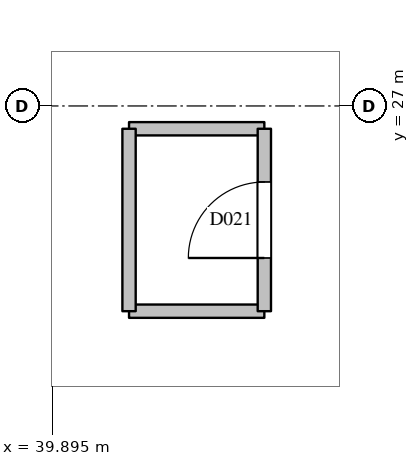
"""IFC4 building model, lengths in metres.
Left out: names, types, materials, properties, quantities, classifications, styles, units other than length and angle.
Written with IfcOpenShell. Run it as: python <this file> out.ifc"""

import sys

from ifc_helpers import new_model, si_unit, direction, frame, frame_2d, origin, place, context, subcontext, project, spatial, rectangle, extrude, element, fill, save


model = new_model("IFC4")
c1 = context("Model", 3, precision=1e-05, world=origin(), true_north=direction((0.0, 1.0)))
c2 = subcontext(c1, "Body", "Model", "MODEL_VIEW")
j1 = project(units=[si_unit("LENGTHUNIT", "METRE"), si_unit("PLANEANGLEUNIT", "RADIAN")], contexts=[c1])
p1 = place(None, origin())
s1 = spatial("IfcSite", under=j1, at=p1, CompositionType="ELEMENT")
p2 = place(p1, origin())
s2 = spatial("IfcBuilding", under=s1, at=p2, CompositionType="ELEMENT")
p3 = place(p2, frame((0.0, 0.0, 42.4)))
s3 = spatial("IfcBuildingStorey", under=s2, at=p3, CompositionType="ELEMENT", Elevation=42.4)
p4 = place(p3, frame((40.9, 24.3, 0.0), z_axis=(0.0, 0.0, 1.0), x_axis=(1.0, 0.0, 0.0)))
e1 = element("IfcWall", 1, at=p4, inside=s3, PredefinedType="PARTITIONING", context=c2, shape_type="SweptSolid", body=[
    extrude(rectangle(XDim=1.78, YDim=0.175, at=frame_2d((0.89, 0.0))), origin(), (0.0, 0.0, 1.0), 3.5),
])
p5 = place(p3, frame((40.9, 26.7, 0.0), z_axis=(0.0, 0.0, 1.0), x_axis=(1.0, 0.0, 0.0)))
e2 = element("IfcWall", 2, at=p5, inside=s3, PredefinedType="PARTITIONING", context=c2, shape_type="SweptSolid", body=[
    extrude(rectangle(XDim=1.78, YDim=0.175, at=frame_2d((0.89, 0.0))), origin(), (0.0, 0.0, 1.0), 2.5),
])
p6 = place(p3, frame((40.9, 24.3, 0.0), z_axis=(0.0, 0.0, 1.0), x_axis=(0.0, 1.0, 0.0)))
e3 = element("IfcWall", 3, at=p6, inside=s3, PredefinedType="PARTITIONING", context=c2, shape_type="SweptSolid", body=[
    extrude(rectangle(XDim=2.4, YDim=0.175, at=frame_2d((1.2, 0.0))), origin(), (0.0, 0.0, 1.0), 2.5),
])
p7 = place(p3, frame((42.68, 24.3, 0.0), z_axis=(0.0, 0.0, 1.0), x_axis=(0.0, 1.0, 0.0)))
e4 = element("IfcWall", 4, at=p7, inside=s3, PredefinedType="PARTITIONING", context=c2, shape_type="SweptSolid", body=[
    extrude(rectangle(XDim=2.4, YDim=0.175, at=frame_2d((1.2, 0.0))), origin(), (0.0, 0.0, 1.0), 2.5),
])
p8 = place(p7, frame((0.7, 0.0, 0.0)))
e5 = element("IfcOpeningElement", 5, at=p8, cuts=e4, PredefinedType="OPENING", context=c2, shape_type="SweptSolid", body=[
    extrude(rectangle(XDim=1.0, YDim=2.1, at=frame_2d((0.5, 1.05))), frame((0.0, 0.097, 0.0), z_axis=(0.0, -1.0, 0.0), x_axis=(1.0, 0.0, 0.0)), (0.0, 0.0, 1.0), 0.195),
])
p9 = place(p8, origin())
e6 = element("IfcDoor", 6, at=p9, inside=s3, OperationType="SINGLE_SWING_LEFT", PredefinedType="DOOR", context=c2, shape_type="SweptSolid", body=[
    extrude(rectangle(XDim=1.0, YDim=2.1, at=frame_2d((0.5, 1.05))), frame((0.0, 0.025, 0.0), z_axis=(0.0, -1.0, 0.0), x_axis=(1.0, 0.0, 0.0)), (0.0, 0.0, 1.0), 0.05),
])
fill(e5, e6)
save(model, sys.argv[1])
